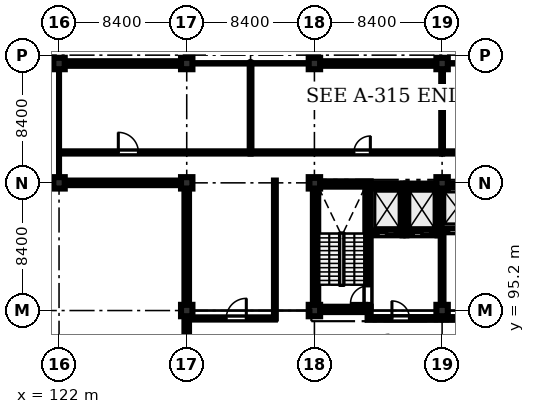
"""IFC4 building model, lengths in metres.
Left out: names, types, materials, properties, quantities, classifications, styles, units other than length and angle.
Written with IfcOpenShell. Run it as: python <this file> out.ifc"""

import sys

from ifc_helpers import new_model, si_unit, direction, frame, frame_2d, origin, origin_2d, place, context, subcontext, project, spatial, rectangle, extrude, element, fill, save


model = new_model("IFC4")
c1 = context("Model", 3, precision=1e-05, world=origin(), true_north=direction((0.0, 1.0)))
c2 = subcontext(c1, "Body", "Model", "MODEL_VIEW")
j1 = project(units=[si_unit("LENGTHUNIT", "METRE"), si_unit("PLANEANGLEUNIT", "RADIAN")], contexts=[c1])
p1 = place(None, origin())
s1 = spatial("IfcSite", under=j1, at=p1, CompositionType="ELEMENT")
p2 = place(p1, origin())
s2 = spatial("IfcBuilding", under=s1, at=p2, CompositionType="ELEMENT")
p3 = place(p2, frame((0.0, 0.0, 52.8)))
s3 = spatial("IfcBuildingStorey", under=s2, at=p3, CompositionType="ELEMENT", Elevation=52.8)
for number, where, z_axis, x_axis in (
    (1, (122.0, 103.6, 0.0), (0.0, 0.0, 1.0), (1.0, 0.0, 0.0)),
    (2, (122.0, 111.45, 0.0), (0.0, 0.0, 1.0), (1.0, 0.0, 0.0)),
    (3, (130.4, 95.2, 0.0), (0.0, 0.0, 1.0), (1.0, 0.0, 0.0)),
    (4, (130.4, 103.6, 0.0), (0.0, 0.0, 1.0), (1.0, 0.0, 0.0)),
    (5, (130.4, 111.45, 0.0), (0.0, 0.0, 1.0), (1.0, 0.0, 0.0)),
    (6, (138.8, 95.2, 0.0), (0.0, 0.0, 1.0), (1.0, 0.0, 0.0)),
    (7, (138.8, 103.6, 0.0), (0.0, 0.0, 1.0), (1.0, 0.0, 0.0)),
    (8, (138.8, 111.45, 0.0), (0.0, 0.0, 1.0), (1.0, 0.0, 0.0)),
    (9, (147.2, 95.2, 0.0), (0.0, 0.0, 1.0), (1.0, 0.0, 0.0)),
    (10, (147.2, 103.6, 0.0), (0.0, 0.0, 1.0), (1.0, 0.0, 0.0)),
    (11, (147.2, 111.45, 0.0), (0.0, 0.0, 1.0), (1.0, 0.0, 0.0)),
):
    element("IfcColumn", number, at=place(p3, frame(where, z_axis=z_axis, x_axis=x_axis)), inside=s3, PredefinedType="COLUMN", context=c2, shape_type="SweptSolid", body=[
        extrude(rectangle(XDim=0.75, YDim=0.75, at=origin_2d()), origin(), (0.0, 0.0, 1.0), 4.03),
    ])
for number, where, z_axis, x_axis in (
    (12, (138.7, 95.275, 0.0), (0.0, 0.0, 1.0), (1.0, 0.0, 0.0)),
    (13, (138.7, 103.525, 0.0), (0.0, 0.0, 1.0), (1.0, 0.0, 0.0)),
):
    element("IfcWall", number, at=place(p3, frame(where, z_axis=z_axis, x_axis=x_axis)), inside=s3, PredefinedType="SHEAR", context=c2, shape_type="SweptSolid", body=[
        extrude(rectangle(XDim=3.8, YDim=0.35, at=frame_2d((1.9, 0.0))), origin(), (0.0, 0.0, 1.0), 4.03),
    ])
p4 = place(p3, frame((138.875, 95.45, 0.0), z_axis=(0.0, 0.0, 1.0), x_axis=(0.0, 1.0, 0.0)))
e14 = element("IfcWall", 14, at=p4, inside=s3, PredefinedType="SHEAR", context=c2, shape_type="SweptSolid", body=[
    extrude(rectangle(XDim=7.9, YDim=0.35, at=frame_2d((3.95, 0.0))), origin(), (0.0, 0.0, 1.0), 4.03),
])
p5 = place(p3, frame((142.325, 95.45, 0.0), z_axis=(0.0, 0.0, 1.0), x_axis=(0.0, 1.0, 0.0)))
e15 = element("IfcWall", 15, at=p5, inside=s3, PredefinedType="SHEAR", context=c2, shape_type="SweptSolid", body=[
    extrude(rectangle(XDim=7.9, YDim=0.35, at=frame_2d((3.95, 0.0))), origin(), (0.0, 0.0, 1.0), 4.03),
])
p6 = place(p5, frame((0.22, 0.0, 0.0)))
e16 = element("IfcOpeningElement", 16, at=p6, cuts=e15, PredefinedType="OPENING", context=c2, shape_type="SweptSolid", body=[
    extrude(rectangle(XDim=1.15, YDim=2.15, at=frame_2d((0.575, 1.075))), frame((0.0, 0.185, 0.0), z_axis=(0.0, -1.0, 0.0), x_axis=(1.0, 0.0, 0.0)), (0.0, 0.0, 1.0), 0.37),
])
p7 = place(p3, frame((142.5, 100.275, 0.0), z_axis=(0.0, 0.0, 1.0), x_axis=(1.0, 0.0, 0.0)))
e17 = element("IfcWall", 17, at=p7, inside=s3, PredefinedType="SHEAR", context=c2, shape_type="SweptSolid", body=[
    extrude(rectangle(XDim=2.1, YDim=0.25, at=frame_2d((1.05, 0.0))), origin(), (0.0, 0.0, 1.0), 4.03),
])
p8 = place(p7, frame((0.5, 0.0, 0.0)))
e18 = element("IfcOpeningElement", 18, at=p8, cuts=e17, PredefinedType="OPENING", context=c2, shape_type="SweptSolid", body=[
    extrude(rectangle(XDim=1.1, YDim=2.15, at=frame_2d((0.55, 1.075))), frame((0.0, 0.135, 0.0), z_axis=(0.0, -1.0, 0.0), x_axis=(1.0, 0.0, 0.0)), (0.0, 0.0, 1.0), 0.27),
])
p9 = place(p3, frame((142.5, 103.425, 0.0), z_axis=(0.0, 0.0, 1.0), x_axis=(1.0, 0.0, 0.0)))
e19 = element("IfcWall", 19, at=p9, inside=s3, PredefinedType="SHEAR", context=c2, shape_type="SweptSolid", body=[
    extrude(rectangle(XDim=2.1, YDim=0.25, at=frame_2d((1.05, 0.0))), origin(), (0.0, 0.0, 1.0), 4.03),
])
p10 = place(p3, frame((144.725, 100.15, 0.0), z_axis=(0.0, 0.0, 1.0), x_axis=(0.0, 1.0, 0.0)))
e20 = element("IfcWall", 20, at=p10, inside=s3, PredefinedType="SHEAR", context=c2, shape_type="SweptSolid", body=[
    extrude(rectangle(XDim=3.4, YDim=0.25, at=frame_2d((1.7, 0.0))), origin(), (0.0, 0.0, 1.0), 4.03),
])
p11 = place(p3, frame((144.85, 100.275, 0.0), z_axis=(0.0, 0.0, 1.0), x_axis=(1.0, 0.0, 0.0)))
e21 = element("IfcWall", 21, at=p11, inside=s3, PredefinedType="SHEAR", context=c2, shape_type="SweptSolid", body=[
    extrude(rectangle(XDim=2.05, YDim=0.25, at=frame_2d((1.025, 0.0))), origin(), (0.0, 0.0, 1.0), 4.03),
])
p12 = place(p11, frame((0.465, 0.0, 0.0)))
e22 = element("IfcOpeningElement", 22, at=p12, cuts=e21, PredefinedType="OPENING", context=c2, shape_type="SweptSolid", body=[
    extrude(rectangle(XDim=1.12, YDim=2.15, at=frame_2d((0.56, 1.075))), frame((0.0, 0.135, 0.0), z_axis=(0.0, -1.0, 0.0), x_axis=(1.0, 0.0, 0.0)), (0.0, 0.0, 1.0), 0.27),
])
p13 = place(p3, frame((144.85, 103.425, 0.0), z_axis=(0.0, 0.0, 1.0), x_axis=(1.0, 0.0, 0.0)))
e23 = element("IfcWall", 23, at=p13, inside=s3, PredefinedType="SHEAR", context=c2, shape_type="SweptSolid", body=[
    extrude(rectangle(XDim=2.05, YDim=0.25, at=frame_2d((1.025, 0.0))), origin(), (0.0, 0.0, 1.0), 4.03),
])
p14 = place(p3, frame((147.025, 100.15, 0.0), z_axis=(0.0, 0.0, 1.0), x_axis=(0.0, 1.0, 0.0)))
e24 = element("IfcWall", 24, at=p14, inside=s3, PredefinedType="SHEAR", context=c2, shape_type="SweptSolid", body=[
    extrude(rectangle(XDim=3.4, YDim=0.25, at=frame_2d((1.7, 0.0))), origin(), (0.0, 0.0, 1.0), 4.03),
])
p15 = place(p3, frame((147.15, 100.475, 0.0), z_axis=(0.0, 0.0, 1.0), x_axis=(1.0, 0.0, 0.0)))
e25 = element("IfcWall", 25, at=p15, inside=s3, PredefinedType="SHEAR", context=c2, shape_type="SweptSolid", body=[
    extrude(rectangle(XDim=2.05, YDim=0.25, at=frame_2d((1.025, 0.0))), origin(), (0.0, 0.0, 1.0), 4.03),
])
p16 = place(p15, frame((0.495, 0.0, 0.0)))
e26 = element("IfcOpeningElement", 26, at=p16, cuts=e25, PredefinedType="OPENING", context=c2, shape_type="SweptSolid", body=[
    extrude(rectangle(XDim=1.06, YDim=2.15, at=frame_2d((0.53, 1.075))), frame((0.0, 0.135, 0.0), z_axis=(0.0, -1.0, 0.0), x_axis=(1.0, 0.0, 0.0)), (0.0, 0.0, 1.0), 0.27),
])
p17 = place(p3, frame((147.15, 103.425, 0.0), z_axis=(0.0, 0.0, 1.0), x_axis=(1.0, 0.0, 0.0)))
e27 = element("IfcWall", 27, at=p17, inside=s3, PredefinedType="SHEAR", context=c2, shape_type="SweptSolid", body=[
    extrude(rectangle(XDim=2.05, YDim=0.25, at=frame_2d((1.025, 0.0))), origin(), (0.0, 0.0, 1.0), 4.03),
])
p18 = place(p3, frame((122.375, 111.45, 0.0), z_axis=(0.0, 0.0, 1.0), x_axis=(1.0, 0.0, 0.0)))
e28 = element("IfcWall", 28, at=p18, inside=s3, PredefinedType="STANDARD", context=c2, shape_type="SweptSolid", body=[
    extrude(rectangle(XDim=7.65, YDim=0.3, at=frame_2d((3.825, 0.0))), origin(), (0.0, 0.0, 1.0), 3.33),
])
p19 = place(p18, frame((0.85, 0.0, 0.9)))
e29 = element("IfcOpeningElement", 29, at=p19, cuts=e28, PredefinedType="OPENING", context=c2, shape_type="SweptSolid", body=[
    extrude(rectangle(XDim=1.9, YDim=2.1, at=frame_2d((0.95, 1.05))), frame((0.0, 0.16, 0.0), z_axis=(0.0, -1.0, 0.0), x_axis=(1.0, 0.0, 0.0)), (0.0, 0.0, 1.0), 0.32),
])
p20 = place(p18, frame((4.65, 0.0, 0.9)))
e30 = element("IfcOpeningElement", 30, at=p20, cuts=e28, PredefinedType="OPENING", context=c2, shape_type="SweptSolid", body=[
    extrude(rectangle(XDim=1.9, YDim=2.1, at=frame_2d((0.95, 1.05))), frame((0.0, 0.16, 0.0), z_axis=(0.0, -1.0, 0.0), x_axis=(1.0, 0.0, 0.0)), (0.0, 0.0, 1.0), 0.32),
])
p21 = place(p3, frame((139.175, 111.45, 0.0), z_axis=(0.0, 0.0, 1.0), x_axis=(1.0, 0.0, 0.0)))
e31 = element("IfcWall", 31, at=p21, inside=s3, PredefinedType="STANDARD", context=c2, shape_type="SweptSolid", body=[
    extrude(rectangle(XDim=7.65, YDim=0.3, at=frame_2d((3.825, 0.0))), origin(), (0.0, 0.0, 1.0), 3.33),
])
p22 = place(p21, frame((0.85, 0.0, 0.9)))
e32 = element("IfcOpeningElement", 32, at=p22, cuts=e31, PredefinedType="OPENING", context=c2, shape_type="SweptSolid", body=[
    extrude(rectangle(XDim=1.9, YDim=2.1, at=frame_2d((0.95, 1.05))), frame((0.0, 0.16, 0.0), z_axis=(0.0, -1.0, 0.0), x_axis=(1.0, 0.0, 0.0)), (0.0, 0.0, 1.0), 0.32),
])
p23 = place(p21, frame((4.65, 0.0, 0.9)))
e33 = element("IfcOpeningElement", 33, at=p23, cuts=e31, PredefinedType="OPENING", context=c2, shape_type="SweptSolid", body=[
    extrude(rectangle(XDim=1.9, YDim=2.1, at=frame_2d((0.95, 1.05))), frame((0.0, 0.16, 0.0), z_axis=(0.0, -1.0, 0.0), x_axis=(1.0, 0.0, 0.0)), (0.0, 0.0, 1.0), 0.32),
])
p24 = place(p3, frame((130.4, 92.15, 0.0), z_axis=(0.0, 0.0, 1.0), x_axis=(0.0, 1.0, 0.0)))
e34 = element("IfcWall", 34, at=p24, inside=s3, PredefinedType="STANDARD", context=c2, shape_type="SweptSolid", body=[
    extrude(rectangle(XDim=2.675, YDim=0.3, at=frame_2d((1.337, 0.0))), origin(), (0.0, 0.0, 1.0), 4.03),
])
p25 = place(p3, frame((130.4, 95.575, 0.0), z_axis=(0.0, 0.0, 1.0), x_axis=(0.0, 1.0, 0.0)))
e35 = element("IfcWall", 35, at=p25, inside=s3, PredefinedType="STANDARD", context=c2, shape_type="SweptSolid", body=[
    extrude(rectangle(XDim=7.65, YDim=0.3, at=frame_2d((3.825, 0.0))), origin(), (0.0, 0.0, 1.0), 3.33),
])
p26 = place(p25, frame((2.4, 0.0, 1.0)))
e36 = element("IfcOpeningElement", 36, at=p26, cuts=e35, PredefinedType="OPENING", context=c2, shape_type="SweptSolid", body=[
    extrude(rectangle(XDim=1.8, YDim=1.8, at=frame_2d((0.9, 0.9))), frame((0.0, 0.16, 0.0), z_axis=(0.0, -1.0, 0.0), x_axis=(1.0, 0.0, 0.0)), (0.0, 0.0, 1.0), 0.32),
])
p27 = place(p3, frame((130.025, 103.6, 0.0), z_axis=(0.0, 0.0, 1.0), x_axis=(-1.0, 0.0, 0.0)))
e37 = element("IfcWall", 37, at=p27, inside=s3, PredefinedType="STANDARD", context=c2, shape_type="SweptSolid", body=[
    extrude(rectangle(XDim=7.65, YDim=0.3, at=frame_2d((3.825, 0.0))), origin(), (0.0, 0.0, 1.0), 3.33),
])
p28 = place(p3, frame((142.3, 94.68, 0.0), z_axis=(0.0, 0.0, 1.0), x_axis=(1.0, 0.0, 0.0)))
e38 = element("IfcWall", 38, at=p28, inside=s3, PredefinedType="STANDARD", context=c2, shape_type="SweptSolid", body=[
    extrude(rectangle(XDim=4.8, YDim=0.18, at=frame_2d((2.4, 0.0))), origin(), (0.0, 0.0, 1.0), 4.03),
])
p29 = place(p28, frame((1.6, 0.0, 0.0)))
e39 = element("IfcOpeningElement", 39, at=p29, cuts=e38, PredefinedType="OPENING", context=c2, shape_type="SweptSolid", body=[
    extrude(rectangle(XDim=1.15, YDim=2.15, at=frame_2d((0.575, 1.075))), frame((0.0, 0.1, 0.0), z_axis=(0.0, -1.0, 0.0), x_axis=(1.0, 0.0, 0.0)), (0.0, 0.0, 1.0), 0.2),
])
p30 = place(p3, frame((147.3, 94.68, 0.0), z_axis=(0.0, 0.0, 1.0), x_axis=(1.0, 0.0, 0.0)))
e40 = element("IfcWall", 40, at=p30, inside=s3, PredefinedType="STANDARD", context=c2, shape_type="SweptSolid", body=[
    extrude(rectangle(XDim=4.85, YDim=0.18, at=frame_2d((2.425, 0.0))), origin(), (0.0, 0.0, 1.0), 4.03),
])
p31 = place(p30, frame((1.6, 0.0, 0.0)))
e41 = element("IfcOpeningElement", 41, at=p31, cuts=e40, PredefinedType="OPENING", context=c2, shape_type="SweptSolid", body=[
    extrude(rectangle(XDim=1.15, YDim=2.15, at=frame_2d((0.575, 1.075))), frame((0.0, 0.1, 0.0), z_axis=(0.0, -1.0, 0.0), x_axis=(1.0, 0.0, 0.0)), (0.0, 0.0, 1.0), 0.2),
])
p32 = place(p3, frame((147.2, 95.75, 0.0), z_axis=(0.0, 0.0, 1.0), x_axis=(0.0, 1.0, 0.0)))
e42 = element("IfcWall", 42, at=p32, inside=s3, PredefinedType="STANDARD", context=c2, shape_type="SweptSolid", body=[
    extrude(rectangle(XDim=4.5, YDim=0.18, at=frame_2d((2.25, 0.0))), origin(), (0.0, 0.0, 1.0), 3.33),
])
p33 = place(p3, frame((136.2, 94.68, 0.0), z_axis=(0.0, 0.0, 1.0), x_axis=(0.0, 1.0, 0.0)))
e43 = element("IfcWall", 43, at=p33, inside=s3, PredefinedType="PARTITIONING", context=c2, shape_type="SweptSolid", body=[
    extrude(rectangle(XDim=9.07, YDim=0.12, at=frame_2d((4.535, 0.0))), origin(), (0.0, 0.0, 1.0), 4.03),
])
p34 = place(p3, frame((130.8, 94.68, 0.0), z_axis=(0.0, 0.0, 1.0), x_axis=(1.0, 0.0, 0.0)))
e44 = element("IfcWall", 44, at=p34, inside=s3, PredefinedType="PARTITIONING", context=c2, shape_type="SweptSolid", body=[
    extrude(rectangle(XDim=5.4, YDim=0.145, at=frame_2d((2.7, 0.0))), origin(), (0.0, 0.0, 1.0), 4.03),
])
p35 = place(p34, frame((2.2, 0.0, 0.0)))
e45 = element("IfcOpeningElement", 45, at=p35, cuts=e44, PredefinedType="OPENING", context=c2, shape_type="SweptSolid", body=[
    extrude(rectangle(XDim=1.32, YDim=2.2, at=frame_2d((0.66, 1.1))), frame((0.0, 0.083, 0.0), z_axis=(0.0, -1.0, 0.0), x_axis=(1.0, 0.0, 0.0)), (0.0, 0.0, 1.0), 0.165),
])
p36 = place(p3, frame((122.15, 105.6, 0.0), z_axis=(0.0, 0.0, 1.0), x_axis=(1.0, 0.0, 0.0)))
e46 = element("IfcWall", 46, at=p36, inside=s3, PredefinedType="PARTITIONING", context=c2, shape_type="SweptSolid", body=[
    extrude(rectangle(XDim=12.45, YDim=0.145, at=frame_2d((6.225, 0.0))), origin(), (0.0, 0.0, 1.0), 4.03),
])
p37 = place(p36, frame((3.75, 0.0, 0.0)))
e47 = element("IfcOpeningElement", 47, at=p37, cuts=e46, PredefinedType="OPENING", context=c2, shape_type="SweptSolid", body=[
    extrude(rectangle(XDim=1.32, YDim=2.2, at=frame_2d((0.66, 1.1))), frame((0.0, 0.083, 0.0), z_axis=(0.0, -1.0, 0.0), x_axis=(1.0, 0.0, 0.0)), (0.0, 0.0, 1.0), 0.165),
])
p38 = place(p3, frame((134.6, 105.6, 0.0), z_axis=(0.0, 0.0, 1.0), x_axis=(1.0, 0.0, 0.0)))
e48 = element("IfcWall", 48, at=p38, inside=s3, PredefinedType="PARTITIONING", context=c2, shape_type="SweptSolid", body=[
    extrude(rectangle(XDim=12.6, YDim=0.145, at=frame_2d((6.3, 0.0))), origin(), (0.0, 0.0, 1.0), 4.03),
])
p39 = place(p38, frame((6.8, 0.0, 0.0)))
e49 = element("IfcOpeningElement", 49, at=p39, cuts=e48, PredefinedType="OPENING", context=c2, shape_type="SweptSolid", body=[
    extrude(rectangle(XDim=1.08, YDim=2.15, at=frame_2d((0.54, 1.075))), frame((0.0, 0.083, 0.0), z_axis=(0.0, -1.0, 0.0), x_axis=(1.0, 0.0, 0.0)), (0.0, 0.0, 1.0), 0.165),
])
p40 = place(p3, frame((134.6, 105.6, 0.0), z_axis=(0.0, 0.0, 1.0), x_axis=(0.0, 1.0, 0.0)))
e50 = element("IfcWall", 50, at=p40, inside=s3, PredefinedType="PARTITIONING", context=c2, shape_type="SweptSolid", body=[
    extrude(rectangle(XDim=5.75, YDim=0.112, at=frame_2d((2.875, 0.0))), origin(), (0.0, 0.0, 1.0), 3.58),
])
p41 = place(p3, frame((147.2, 105.6, 0.0), z_axis=(0.0, 0.0, 1.0), x_axis=(1.0, 0.0, 0.0)))
e51 = element("IfcWall", 51, at=p41, inside=s3, PredefinedType="PARTITIONING", context=c2, shape_type="SweptSolid", body=[
    extrude(rectangle(XDim=8.4, YDim=0.145, at=frame_2d((4.2, 0.0))), origin(), (0.0, 0.0, 1.0), 4.03),
])
p42 = place(p41, frame((3.4, 0.0, 0.0)))
e52 = element("IfcOpeningElement", 52, at=p42, cuts=e51, PredefinedType="OPENING", context=c2, shape_type="SweptSolid", body=[
    extrude(rectangle(XDim=1.32, YDim=2.2, at=frame_2d((0.66, 1.1))), frame((0.0, 0.083, 0.0), z_axis=(0.0, -1.0, 0.0), x_axis=(1.0, 0.0, 0.0)), (0.0, 0.0, 1.0), 0.165),
])
p43 = place(p3, frame((147.2, 105.6, 0.0), z_axis=(0.0, 0.0, 1.0), x_axis=(0.0, 1.0, 0.0)))
e53 = element("IfcWall", 53, at=p43, inside=s3, PredefinedType="PARTITIONING", context=c2, shape_type="SweptSolid", body=[
    extrude(rectangle(XDim=5.75, YDim=0.112, at=frame_2d((2.875, 0.0))), origin(), (0.0, 0.0, 1.0), 3.33),
])
p44 = place(p19, origin())
e54 = element("IfcWindow", 54, at=p44, inside=s3, PartitioningType="DOUBLE_PANEL_VERTICAL", PredefinedType="WINDOW", context=c2, shape_type="SweptSolid", body=[
    extrude(rectangle(XDim=1.9, YDim=2.1, at=frame_2d((0.95, 1.05))), frame((0.0, 0.03, 0.0), z_axis=(0.0, -1.0, 0.0), x_axis=(1.0, 0.0, 0.0)), (0.0, 0.0, 1.0), 0.06),
])
fill(e29, e54)
p45 = place(p20, origin())
e55 = element("IfcWindow", 55, at=p45, inside=s3, PartitioningType="DOUBLE_PANEL_VERTICAL", PredefinedType="WINDOW", context=c2, shape_type="SweptSolid", body=[
    extrude(rectangle(XDim=1.9, YDim=2.1, at=frame_2d((0.95, 1.05))), frame((0.0, 0.03, 0.0), z_axis=(0.0, -1.0, 0.0), x_axis=(1.0, 0.0, 0.0)), (0.0, 0.0, 1.0), 0.06),
])
fill(e30, e55)
p46 = place(p22, origin())
e56 = element("IfcWindow", 56, at=p46, inside=s3, PartitioningType="DOUBLE_PANEL_VERTICAL", PredefinedType="WINDOW", context=c2, shape_type="SweptSolid", body=[
    extrude(rectangle(XDim=1.9, YDim=2.1, at=frame_2d((0.95, 1.05))), frame((0.0, 0.03, 0.0), z_axis=(0.0, -1.0, 0.0), x_axis=(1.0, 0.0, 0.0)), (0.0, 0.0, 1.0), 0.06),
])
fill(e32, e56)
p47 = place(p23, origin())
e57 = element("IfcWindow", 57, at=p47, inside=s3, PartitioningType="DOUBLE_PANEL_VERTICAL", PredefinedType="WINDOW", context=c2, shape_type="SweptSolid", body=[
    extrude(rectangle(XDim=1.9, YDim=2.1, at=frame_2d((0.95, 1.05))), frame((0.0, 0.03, 0.0), z_axis=(0.0, -1.0, 0.0), x_axis=(1.0, 0.0, 0.0)), (0.0, 0.0, 1.0), 0.06),
])
fill(e33, e57)
p48 = place(p26, origin())
e58 = element("IfcWindow", 58, at=p48, inside=s3, PartitioningType="DOUBLE_PANEL_VERTICAL", PredefinedType="WINDOW", context=c2, shape_type="SweptSolid", body=[
    extrude(rectangle(XDim=1.8, YDim=1.8, at=frame_2d((0.9, 0.9))), frame((0.0, 0.03, 0.0), z_axis=(0.0, -1.0, 0.0), x_axis=(1.0, 0.0, 0.0)), (0.0, 0.0, 1.0), 0.06),
])
fill(e36, e58)
p49 = place(p29, origin())
e59 = element("IfcDoor", 59, at=p49, inside=s3, OperationType="SINGLE_SWING_LEFT", PredefinedType="DOOR", context=c2, shape_type="SweptSolid", body=[
    extrude(rectangle(XDim=1.15, YDim=2.15, at=frame_2d((0.575, 1.075))), frame((0.0, 0.025, 0.0), z_axis=(0.0, -1.0, 0.0), x_axis=(1.0, 0.0, 0.0)), (0.0, 0.0, 1.0), 0.05),
])
fill(e39, e59)
p50 = place(p35, origin())
e60 = element("IfcDoor", 60, at=p50, inside=s3, OperationType="SINGLE_SWING_RIGHT", PredefinedType="DOOR", context=c2, shape_type="SweptSolid", body=[
    extrude(rectangle(XDim=1.32, YDim=2.2, at=frame_2d((0.66, 1.1))), frame((0.0, 0.025, 0.0), z_axis=(0.0, -1.0, 0.0), x_axis=(1.0, 0.0, 0.0)), (0.0, 0.0, 1.0), 0.05),
])
fill(e45, e60)
p51 = place(p37, origin())
e61 = element("IfcDoor", 61, at=p51, inside=s3, OperationType="SINGLE_SWING_LEFT", PredefinedType="DOOR", context=c2, shape_type="SweptSolid", body=[
    extrude(rectangle(XDim=1.32, YDim=2.2, at=frame_2d((0.66, 1.1))), frame((0.0, 0.025, 0.0), z_axis=(0.0, -1.0, 0.0), x_axis=(1.0, 0.0, 0.0)), (0.0, 0.0, 1.0), 0.05),
])
fill(e47, e61)
p52 = place(p39, origin())
e62 = element("IfcDoor", 62, at=p52, inside=s3, OperationType="SINGLE_SWING_RIGHT", PredefinedType="DOOR", context=c2, shape_type="SweptSolid", body=[
    extrude(rectangle(XDim=1.08, YDim=2.15, at=frame_2d((0.54, 1.075))), frame((0.0, 0.025, 0.0), z_axis=(0.0, -1.0, 0.0), x_axis=(1.0, 0.0, 0.0)), (0.0, 0.0, 1.0), 0.05),
])
fill(e49, e62)
p53 = place(p6, origin())
e63 = element("IfcDoor", 63, at=p53, inside=s3, OperationType="SINGLE_SWING_LEFT", PredefinedType="DOOR", context=c2, shape_type="SweptSolid", body=[
    extrude(rectangle(XDim=1.15, YDim=2.15, at=frame_2d((0.575, 1.075))), frame((0.0, 0.025, 0.0), z_axis=(0.0, -1.0, 0.0), x_axis=(1.0, 0.0, 0.0)), (0.0, 0.0, 1.0), 0.05),
])
fill(e16, e63)
p54 = place(p8, origin())
e64 = element("IfcDoor", 64, at=p54, inside=s3, OperationType="SLIDING_TO_LEFT", PredefinedType="DOOR", context=c2, shape_type="SweptSolid", body=[
    extrude(rectangle(XDim=1.1, YDim=2.15, at=frame_2d((0.55, 1.075))), frame((0.0, 0.025, 0.0), z_axis=(0.0, -1.0, 0.0), x_axis=(1.0, 0.0, 0.0)), (0.0, 0.0, 1.0), 0.05),
])
fill(e18, e64)
p55 = place(p12, origin())
e65 = element("IfcDoor", 65, at=p55, inside=s3, OperationType="SLIDING_TO_LEFT", PredefinedType="DOOR", context=c2, shape_type="SweptSolid", body=[
    extrude(rectangle(XDim=1.12, YDim=2.15, at=frame_2d((0.56, 1.075))), frame((0.0, 0.025, 0.0), z_axis=(0.0, -1.0, 0.0), x_axis=(1.0, 0.0, 0.0)), (0.0, 0.0, 1.0), 0.05),
])
fill(e22, e65)
p56 = place(p16, origin())
e66 = element("IfcDoor", 66, at=p56, inside=s3, OperationType="SLIDING_TO_LEFT", PredefinedType="DOOR", context=c2, shape_type="SweptSolid", body=[
    extrude(rectangle(XDim=1.06, YDim=2.15, at=frame_2d((0.53, 1.075))), frame((0.0, 0.025, 0.0), z_axis=(0.0, -1.0, 0.0), x_axis=(1.0, 0.0, 0.0)), (0.0, 0.0, 1.0), 0.05),
])
fill(e26, e66)
save(model, sys.argv[1])
